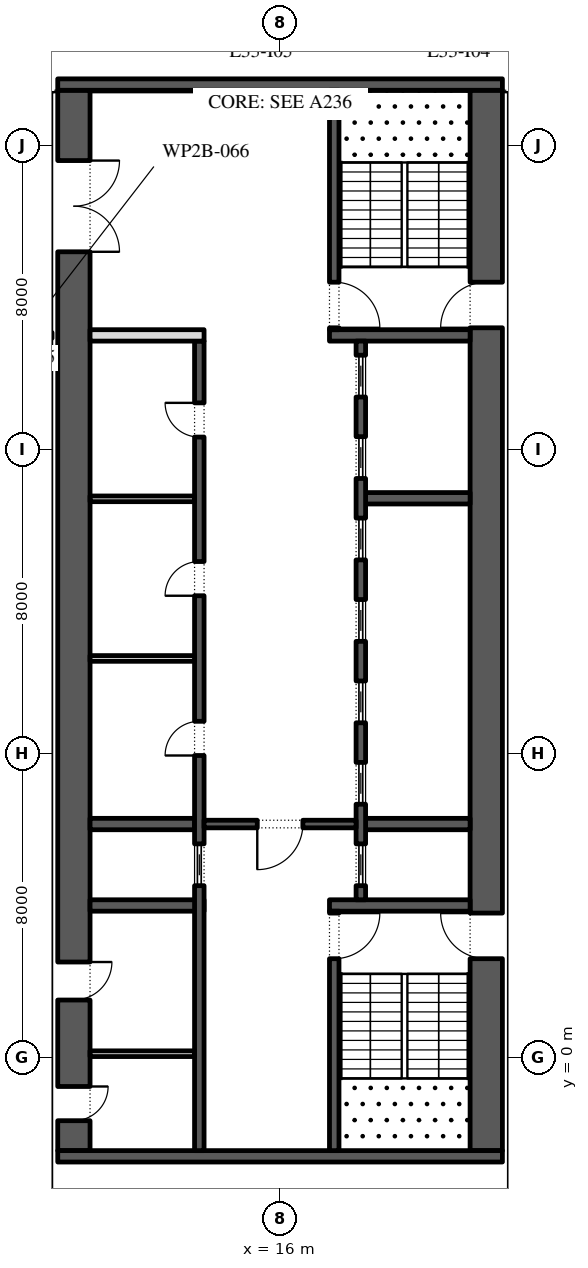
"""IFC4 building model, lengths in metres.
Left out: names, types, materials, properties, quantities, classifications, styles, units other than length and angle.
Written with IfcOpenShell. Run it as: python <this file> out.ifc"""

import sys

from ifc_helpers import new_model, si_unit, direction, frame, frame_2d, origin, place, context, subcontext, project, spatial, rectangle, extrude, element, fill, save


model = new_model("IFC4")
c1 = context("Model", 3, precision=1e-05, world=origin(), true_north=direction((0.0, 1.0)))
c2 = subcontext(c1, "Body", "Model", "MODEL_VIEW")
j1 = project(units=[si_unit("LENGTHUNIT", "METRE"), si_unit("PLANEANGLEUNIT", "RADIAN")], contexts=[c1])
p1 = place(None, origin())
s1 = spatial("IfcSite", under=j1, at=p1, CompositionType="ELEMENT")
p2 = place(p1, origin())
s2 = spatial("IfcBuilding", under=s1, at=p2, CompositionType="ELEMENT")
p3 = place(p2, frame((0.0, 0.0, 151.8)))
s3 = spatial("IfcBuildingStorey", under=s2, at=p3, CompositionType="ELEMENT", Elevation=151.8)
p4 = place(p3, frame((21.425, -2.45, 0.0), z_axis=(0.0, 0.0, 1.0), x_axis=(0.0, 1.0, 0.0)))
e1 = element("IfcWall", 1, at=p4, inside=s3, PredefinedType="SHEAR", context=c2, shape_type="SweptSolid", body=[
    extrude(rectangle(XDim=27.9, YDim=0.85, at=frame_2d((13.95, 0.0))), origin(), (0.0, 0.0, 1.0), 3.95),
])
p5 = place(p4, frame((5.05, 0.0, 0.0)))
e2 = element("IfcOpeningElement", 2, at=p5, cuts=e1, PredefinedType="OPENING", context=c2, shape_type="SweptSolid", body=[
    extrude(rectangle(XDim=1.2, YDim=2.1, at=frame_2d((0.6, 1.05))), frame((0.0, 0.435, 0.0), z_axis=(0.0, -1.0, 0.0), x_axis=(1.0, 0.0, 0.0)), (0.0, 0.0, 1.0), 0.87),
])
p6 = place(p4, frame((21.65, 0.0, 0.0)))
e3 = element("IfcOpeningElement", 3, at=p6, cuts=e1, PredefinedType="OPENING", context=c2, shape_type="SweptSolid", body=[
    extrude(rectangle(XDim=1.2, YDim=2.1, at=frame_2d((0.6, 1.05))), frame((0.0, 0.435, 0.0), z_axis=(0.0, -1.0, 0.0), x_axis=(1.0, 0.0, 0.0)), (0.0, 0.0, 1.0), 0.87),
])
p7 = place(p3, frame((10.575, -2.45, 0.0), z_axis=(0.0, 0.0, 1.0), x_axis=(0.0, 1.0, 0.0)))
e4 = element("IfcWall", 4, at=p7, inside=s3, PredefinedType="SHEAR", context=c2, shape_type="SweptSolid", body=[
    extrude(rectangle(XDim=27.9, YDim=0.85, at=frame_2d((13.95, 0.0))), origin(), (0.0, 0.0, 1.0), 3.95),
])
p8 = place(p7, frame((23.65, 0.0, 0.0)))
e5 = element("IfcOpeningElement", 5, at=p8, cuts=e4, PredefinedType="OPENING", context=c2, shape_type="SweptSolid", body=[
    extrude(rectangle(XDim=2.4, YDim=2.1, at=frame_2d((1.2, 1.05))), frame((0.0, 0.435, 0.0), z_axis=(0.0, -1.0, 0.0), x_axis=(1.0, 0.0, 0.0)), (0.0, 0.0, 1.0), 0.87),
])
p9 = place(p7, frame((0.788, 0.0, 0.0)))
e6 = element("IfcOpeningElement", 6, at=p9, cuts=e4, PredefinedType="OPENING", context=c2, shape_type="SweptSolid", body=[
    extrude(rectangle(XDim=0.9, YDim=2.1, at=frame_2d((0.45, 1.05))), frame((0.0, 0.435, 0.0), z_axis=(0.0, -1.0, 0.0), x_axis=(1.0, 0.0, 0.0)), (0.0, 0.0, 1.0), 0.87),
])
p10 = place(p7, frame((3.962, 0.0, 0.0)))
e7 = element("IfcOpeningElement", 7, at=p10, cuts=e4, PredefinedType="OPENING", context=c2, shape_type="SweptSolid", body=[
    extrude(rectangle(XDim=1.0, YDim=2.1, at=frame_2d((0.5, 1.05))), frame((0.0, 0.435, 0.0), z_axis=(0.0, -1.0, 0.0), x_axis=(1.0, 0.0, 0.0)), (0.0, 0.0, 1.0), 0.87),
])
for number, where, z_axis, x_axis in (
    (8, (10.15, -2.6, 0.0), (0.0, 0.0, 1.0), (1.0, 0.0, 0.0)),
    (9, (10.15, 25.6, 0.0), (0.0, 0.0, 1.0), (1.0, 0.0, 0.0)),
):
    element("IfcWall", number, at=place(p3, frame(where, z_axis=z_axis, x_axis=x_axis)), inside=s3, PredefinedType="SHEAR", context=c2, shape_type="SweptSolid", body=[
        extrude(rectangle(XDim=11.7, YDim=0.3, at=frame_2d((5.85, 0.0))), origin(), (0.0, 0.0, 1.0), 3.95),
    ])
p11 = place(p3, frame((17.3, 4.0, 0.0), z_axis=(0.0, 0.0, 1.0), x_axis=(1.0, 0.0, 0.0)))
e10 = element("IfcWall", 10, at=p11, inside=s3, PredefinedType="SHEAR", context=c2, shape_type="SweptSolid", body=[
    extrude(rectangle(XDim=3.7, YDim=0.3, at=frame_2d((1.85, 0.0))), origin(), (0.0, 0.0, 1.0), 3.95),
])
p12 = place(p3, frame((17.425, -2.45, 0.0), z_axis=(0.0, 0.0, 1.0), x_axis=(0.0, 1.0, 0.0)))
e11 = element("IfcWall", 11, at=p12, inside=s3, PredefinedType="SHEAR", context=c2, shape_type="SweptSolid", body=[
    extrude(rectangle(XDim=6.3, YDim=0.25, at=frame_2d((3.15, 0.0))), origin(), (0.0, 0.0, 1.0), 3.95),
])
p13 = place(p12, frame((5.05, 0.0, 0.0)))
e12 = element("IfcOpeningElement", 12, at=p13, cuts=e11, PredefinedType="OPENING", context=c2, shape_type="SweptSolid", body=[
    extrude(rectangle(XDim=1.2, YDim=2.1, at=frame_2d((0.6, 1.05))), frame((0.0, 0.135, 0.0), z_axis=(0.0, -1.0, 0.0), x_axis=(1.0, 0.0, 0.0)), (0.0, 0.0, 1.0), 0.27),
])
p14 = place(p3, frame((17.3, 19.0, 0.0), z_axis=(0.0, 0.0, 1.0), x_axis=(1.0, 0.0, 0.0)))
e13 = element("IfcWall", 13, at=p14, inside=s3, PredefinedType="SHEAR", context=c2, shape_type="SweptSolid", body=[
    extrude(rectangle(XDim=3.7, YDim=0.3, at=frame_2d((1.85, 0.0))), origin(), (0.0, 0.0, 1.0), 3.95),
])
p15 = place(p3, frame((17.425, 19.15, 0.0), z_axis=(0.0, 0.0, 1.0), x_axis=(0.0, 1.0, 0.0)))
e14 = element("IfcWall", 14, at=p15, inside=s3, PredefinedType="SHEAR", context=c2, shape_type="SweptSolid", body=[
    extrude(rectangle(XDim=6.3, YDim=0.25, at=frame_2d((3.15, 0.0))), origin(), (0.0, 0.0, 1.0), 3.95),
])
p16 = place(p15, frame((0.05, 0.0, 0.0)))
e15 = element("IfcOpeningElement", 15, at=p16, cuts=e14, PredefinedType="OPENING", context=c2, shape_type="SweptSolid", body=[
    extrude(rectangle(XDim=1.2, YDim=2.1, at=frame_2d((0.6, 1.05))), frame((0.0, 0.135, 0.0), z_axis=(0.0, -1.0, 0.0), x_axis=(1.0, 0.0, 0.0)), (0.0, 0.0, 1.0), 0.27),
])
for number, where, z_axis, x_axis in (
    (16, (18.25, 6.143, 0.0), (0.0, 0.0, 1.0), (1.0, 0.0, 0.0)),
    (17, (18.25, 14.714, 0.0), (0.0, 0.0, 1.0), (1.0, 0.0, 0.0)),
):
    element("IfcWall", number, at=place(p3, frame(where, z_axis=z_axis, x_axis=x_axis)), inside=s3, PredefinedType="SHEAR", context=c2, shape_type="SweptSolid", body=[
        extrude(rectangle(XDim=2.75, YDim=0.3, at=frame_2d((1.375, 0.0))), origin(), (0.0, 0.0, 1.0), 3.95),
    ])
p17 = place(p3, frame((18.125, 4.15, 0.0), z_axis=(0.0, 0.0, 1.0), x_axis=(0.0, 1.0, 0.0)))
e18 = element("IfcWall", 18, at=p17, inside=s3, PredefinedType="SHEAR", context=c2, shape_type="SweptSolid", body=[
    extrude(rectangle(XDim=14.7, YDim=0.25, at=frame_2d((7.35, 0.0))), origin(), (0.0, 0.0, 1.0), 3.95),
])
p18 = place(p17, frame((0.371, 0.0, 0.0)))
e19 = element("IfcOpeningElement", 19, at=p18, cuts=e18, PredefinedType="OPENING", context=c2, shape_type="SweptSolid", body=[
    extrude(rectangle(XDim=1.1, YDim=2.1, at=frame_2d((0.55, 1.05))), frame((0.0, 0.135, 0.0), z_axis=(0.0, -1.0, 0.0), x_axis=(1.0, 0.0, 0.0)), (0.0, 0.0, 1.0), 0.27),
])
p19 = place(p17, frame((2.514, 0.0, 0.0)))
e20 = element("IfcOpeningElement", 20, at=p19, cuts=e18, PredefinedType="OPENING", context=c2, shape_type="SweptSolid", body=[
    extrude(rectangle(XDim=1.1, YDim=2.1, at=frame_2d((0.55, 1.05))), frame((0.0, 0.135, 0.0), z_axis=(0.0, -1.0, 0.0), x_axis=(1.0, 0.0, 0.0)), (0.0, 0.0, 1.0), 0.27),
])
p20 = place(p17, frame((4.657, 0.0, 0.0)))
e21 = element("IfcOpeningElement", 21, at=p20, cuts=e18, PredefinedType="OPENING", context=c2, shape_type="SweptSolid", body=[
    extrude(rectangle(XDim=1.1, YDim=2.1, at=frame_2d((0.55, 1.05))), frame((0.0, 0.135, 0.0), z_axis=(0.0, -1.0, 0.0), x_axis=(1.0, 0.0, 0.0)), (0.0, 0.0, 1.0), 0.27),
])
p21 = place(p17, frame((6.8, 0.0, 0.0)))
e22 = element("IfcOpeningElement", 22, at=p21, cuts=e18, PredefinedType="OPENING", context=c2, shape_type="SweptSolid", body=[
    extrude(rectangle(XDim=1.1, YDim=2.1, at=frame_2d((0.55, 1.05))), frame((0.0, 0.135, 0.0), z_axis=(0.0, -1.0, 0.0), x_axis=(1.0, 0.0, 0.0)), (0.0, 0.0, 1.0), 0.27),
])
p22 = place(p17, frame((8.943, 0.0, 0.0)))
e23 = element("IfcOpeningElement", 23, at=p22, cuts=e18, PredefinedType="OPENING", context=c2, shape_type="SweptSolid", body=[
    extrude(rectangle(XDim=1.1, YDim=2.1, at=frame_2d((0.55, 1.05))), frame((0.0, 0.135, 0.0), z_axis=(0.0, -1.0, 0.0), x_axis=(1.0, 0.0, 0.0)), (0.0, 0.0, 1.0), 0.27),
])
p23 = place(p17, frame((11.086, 0.0, 0.0)))
e24 = element("IfcOpeningElement", 24, at=p23, cuts=e18, PredefinedType="OPENING", context=c2, shape_type="SweptSolid", body=[
    extrude(rectangle(XDim=1.1, YDim=2.1, at=frame_2d((0.55, 1.05))), frame((0.0, 0.135, 0.0), z_axis=(0.0, -1.0, 0.0), x_axis=(1.0, 0.0, 0.0)), (0.0, 0.0, 1.0), 0.27),
])
p24 = place(p17, frame((13.229, 0.0, 0.0)))
e25 = element("IfcOpeningElement", 25, at=p24, cuts=e18, PredefinedType="OPENING", context=c2, shape_type="SweptSolid", body=[
    extrude(rectangle(XDim=1.1, YDim=2.1, at=frame_2d((0.55, 1.05))), frame((0.0, 0.135, 0.0), z_axis=(0.0, -1.0, 0.0), x_axis=(1.0, 0.0, 0.0)), (0.0, 0.0, 1.0), 0.27),
])
p25 = place(p3, frame((11.0, 4.0, 0.0), z_axis=(0.0, 0.0, 1.0), x_axis=(1.0, 0.0, 0.0)))
e26 = element("IfcWall", 26, at=p25, inside=s3, PredefinedType="SHEAR", context=c2, shape_type="SweptSolid", body=[
    extrude(rectangle(XDim=3.0, YDim=0.3, at=frame_2d((1.5, 0.0))), origin(), (0.0, 0.0, 1.0), 3.95),
])
p26 = place(p3, frame((11.0, 6.143, 0.0), z_axis=(0.0, 0.0, 1.0), x_axis=(1.0, 0.0, 0.0)))
e27 = element("IfcWall", 27, at=p26, inside=s3, PredefinedType="SHEAR", context=c2, shape_type="SweptSolid", body=[
    extrude(rectangle(XDim=2.75, YDim=0.3, at=frame_2d((1.375, 0.0))), origin(), (0.0, 0.0, 1.0), 3.95),
])
p27 = place(p3, frame((13.875, -2.45, 0.0), z_axis=(0.0, 0.0, 1.0), x_axis=(0.0, 1.0, 0.0)))
e28 = element("IfcWall", 28, at=p27, inside=s3, PredefinedType="SHEAR", context=c2, shape_type="SweptSolid", body=[
    extrude(rectangle(XDim=21.3, YDim=0.25, at=frame_2d((10.65, 0.0))), origin(), (0.0, 0.0, 1.0), 3.95),
])
p28 = place(p27, frame((10.396, 0.0, 0.0)))
e29 = element("IfcOpeningElement", 29, at=p28, cuts=e28, PredefinedType="OPENING", context=c2, shape_type="SweptSolid", body=[
    extrude(rectangle(XDim=0.9, YDim=2.1, at=frame_2d((0.45, 1.05))), frame((0.0, 0.135, 0.0), z_axis=(0.0, -1.0, 0.0), x_axis=(1.0, 0.0, 0.0)), (0.0, 0.0, 1.0), 0.27),
])
p29 = place(p27, frame((14.6, 0.0, 0.0)))
e30 = element("IfcOpeningElement", 30, at=p29, cuts=e28, PredefinedType="OPENING", context=c2, shape_type="SweptSolid", body=[
    extrude(rectangle(XDim=0.9, YDim=2.1, at=frame_2d((0.45, 1.05))), frame((0.0, 0.135, 0.0), z_axis=(0.0, -1.0, 0.0), x_axis=(1.0, 0.0, 0.0)), (0.0, 0.0, 1.0), 0.27),
])
p30 = place(p27, frame((18.775, 0.0, 0.0)))
e31 = element("IfcOpeningElement", 31, at=p30, cuts=e28, PredefinedType="OPENING", context=c2, shape_type="SweptSolid", body=[
    extrude(rectangle(XDim=0.9, YDim=2.1, at=frame_2d((0.45, 1.05))), frame((0.0, 0.135, 0.0), z_axis=(0.0, -1.0, 0.0), x_axis=(1.0, 0.0, 0.0)), (0.0, 0.0, 1.0), 0.27),
])
p31 = place(p27, frame((6.971, 0.0, 0.0)))
e32 = element("IfcOpeningElement", 32, at=p31, cuts=e28, PredefinedType="OPENING", context=c2, shape_type="SweptSolid", body=[
    extrude(rectangle(XDim=1.1, YDim=2.1, at=frame_2d((0.55, 1.05))), frame((0.0, 0.135, 0.0), z_axis=(0.0, -1.0, 0.0), x_axis=(1.0, 0.0, 0.0)), (0.0, 0.0, 1.0), 0.27),
])
p32 = place(p3, frame((11.0, 19.0, 0.0), z_axis=(0.0, 0.0, 1.0), x_axis=(1.0, 0.0, 0.0)))
e33 = element("IfcWall", 33, at=p32, inside=s3, PredefinedType="PARTITIONING", context=c2, shape_type="SweptSolid", body=[
    extrude(rectangle(XDim=3.0, YDim=0.3, at=frame_2d((1.5, 0.0))), origin(), (0.0, 0.0, 1.0), 3.95),
])
for number, where, z_axis, x_axis in (
    (34, (11.0, 10.5, 0.0), (0.0, 0.0, 1.0), (1.0, 0.0, 0.0)),
    (35, (11.0, 14.7, 0.0), (0.0, 0.0, 1.0), (1.0, 0.0, 0.0)),
):
    element("IfcWall", number, at=place(p3, frame(where, z_axis=z_axis, x_axis=x_axis)), inside=s3, PredefinedType="PARTITIONING", context=c2, shape_type="SweptSolid", body=[
        extrude(rectangle(XDim=2.75, YDim=0.15, at=frame_2d((1.375, 0.0))), origin(), (0.0, 0.0, 1.0), 3.95),
    ])
p33 = place(p3, frame((14.0, 6.143, 0.0), z_axis=(0.0, 0.0, 1.0), x_axis=(1.0, 0.0, 0.0)))
e36 = element("IfcWall", 36, at=p33, inside=s3, PredefinedType="SHEAR", context=c2, shape_type="SweptSolid", body=[
    extrude(rectangle(XDim=4.0, YDim=0.2, at=frame_2d((2.0, 0.0))), origin(), (0.0, 0.0, 1.0), 3.95),
])
p34 = place(p33, frame((1.4, 0.0, 0.0)))
e37 = element("IfcOpeningElement", 37, at=p34, cuts=e36, PredefinedType="OPENING", context=c2, shape_type="SweptSolid", body=[
    extrude(rectangle(XDim=1.2, YDim=2.1, at=frame_2d((0.6, 1.05))), frame((0.0, 0.11, 0.0), z_axis=(0.0, -1.0, 0.0), x_axis=(1.0, 0.0, 0.0)), (0.0, 0.0, 1.0), 0.22),
])
p35 = place(p3, frame((11.0, 0.1, 0.0), z_axis=(0.0, 0.0, 1.0), x_axis=(1.0, 0.0, 0.0)))
e38 = element("IfcWall", 38, at=p35, inside=s3, PredefinedType="PARTITIONING", context=c2, shape_type="SweptSolid", body=[
    extrude(rectangle(XDim=2.75, YDim=0.15, at=frame_2d((1.375, 0.0))), origin(), (0.0, 0.0, 1.0), 3.95),
])
p36 = place(p18, origin())
e39 = element("IfcDoor", 39, at=p36, inside=s3, OperationType="SLIDING_TO_LEFT", PredefinedType="DOOR", context=c2, shape_type="SweptSolid", body=[
    extrude(rectangle(XDim=1.1, YDim=2.1, at=frame_2d((0.55, 1.05))), frame((0.0, 0.025, 0.0), z_axis=(0.0, -1.0, 0.0), x_axis=(1.0, 0.0, 0.0)), (0.0, 0.0, 1.0), 0.05),
])
fill(e19, e39)
p37 = place(p19, origin())
e40 = element("IfcDoor", 40, at=p37, inside=s3, OperationType="SLIDING_TO_LEFT", PredefinedType="DOOR", context=c2, shape_type="SweptSolid", body=[
    extrude(rectangle(XDim=1.1, YDim=2.1, at=frame_2d((0.55, 1.05))), frame((0.0, 0.025, 0.0), z_axis=(0.0, -1.0, 0.0), x_axis=(1.0, 0.0, 0.0)), (0.0, 0.0, 1.0), 0.05),
])
fill(e20, e40)
p38 = place(p20, origin())
e41 = element("IfcDoor", 41, at=p38, inside=s3, OperationType="SLIDING_TO_LEFT", PredefinedType="DOOR", context=c2, shape_type="SweptSolid", body=[
    extrude(rectangle(XDim=1.1, YDim=2.1, at=frame_2d((0.55, 1.05))), frame((0.0, 0.025, 0.0), z_axis=(0.0, -1.0, 0.0), x_axis=(1.0, 0.0, 0.0)), (0.0, 0.0, 1.0), 0.05),
])
fill(e21, e41)
p39 = place(p21, origin())
e42 = element("IfcDoor", 42, at=p39, inside=s3, OperationType="SLIDING_TO_LEFT", PredefinedType="DOOR", context=c2, shape_type="SweptSolid", body=[
    extrude(rectangle(XDim=1.1, YDim=2.1, at=frame_2d((0.55, 1.05))), frame((0.0, 0.025, 0.0), z_axis=(0.0, -1.0, 0.0), x_axis=(1.0, 0.0, 0.0)), (0.0, 0.0, 1.0), 0.05),
])
fill(e22, e42)
p40 = place(p22, origin())
e43 = element("IfcDoor", 43, at=p40, inside=s3, OperationType="SLIDING_TO_LEFT", PredefinedType="DOOR", context=c2, shape_type="SweptSolid", body=[
    extrude(rectangle(XDim=1.1, YDim=2.1, at=frame_2d((0.55, 1.05))), frame((0.0, 0.025, 0.0), z_axis=(0.0, -1.0, 0.0), x_axis=(1.0, 0.0, 0.0)), (0.0, 0.0, 1.0), 0.05),
])
fill(e23, e43)
p41 = place(p23, origin())
e44 = element("IfcDoor", 44, at=p41, inside=s3, OperationType="SLIDING_TO_LEFT", PredefinedType="DOOR", context=c2, shape_type="SweptSolid", body=[
    extrude(rectangle(XDim=1.1, YDim=2.1, at=frame_2d((0.55, 1.05))), frame((0.0, 0.025, 0.0), z_axis=(0.0, -1.0, 0.0), x_axis=(1.0, 0.0, 0.0)), (0.0, 0.0, 1.0), 0.05),
])
fill(e24, e44)
p42 = place(p24, origin())
e45 = element("IfcDoor", 45, at=p42, inside=s3, OperationType="SLIDING_TO_LEFT", PredefinedType="DOOR", context=c2, shape_type="SweptSolid", body=[
    extrude(rectangle(XDim=1.1, YDim=2.1, at=frame_2d((0.55, 1.05))), frame((0.0, 0.025, 0.0), z_axis=(0.0, -1.0, 0.0), x_axis=(1.0, 0.0, 0.0)), (0.0, 0.0, 1.0), 0.05),
])
fill(e25, e45)
p43 = place(p28, origin())
e46 = element("IfcDoor", 46, at=p43, inside=s3, OperationType="SINGLE_SWING_RIGHT", PredefinedType="DOOR", context=c2, shape_type="SweptSolid", body=[
    extrude(rectangle(XDim=0.9, YDim=2.1, at=frame_2d((0.45, 1.05))), frame((0.0, 0.125, 0.0), z_axis=(0.0, -1.0, 0.0), x_axis=(1.0, 0.0, 0.0)), (0.0, 0.0, 1.0), 0.05),
])
fill(e29, e46)
p44 = place(p29, origin())
e47 = element("IfcDoor", 47, at=p44, inside=s3, OperationType="SINGLE_SWING_RIGHT", PredefinedType="DOOR", context=c2, shape_type="SweptSolid", body=[
    extrude(rectangle(XDim=0.9, YDim=2.1, at=frame_2d((0.45, 1.05))), frame((0.0, 0.125, 0.0), z_axis=(0.0, -1.0, 0.0), x_axis=(1.0, 0.0, 0.0)), (0.0, 0.0, 1.0), 0.05),
])
fill(e30, e47)
p45 = place(p30, origin())
e48 = element("IfcDoor", 48, at=p45, inside=s3, OperationType="SINGLE_SWING_LEFT", PredefinedType="DOOR", context=c2, shape_type="SweptSolid", body=[
    extrude(rectangle(XDim=0.9, YDim=2.1, at=frame_2d((0.45, 1.05))), frame((0.0, 0.125, 0.0), z_axis=(0.0, -1.0, 0.0), x_axis=(1.0, 0.0, 0.0)), (0.0, 0.0, 1.0), 0.05),
])
fill(e31, e48)
p46 = place(p31, origin())
e49 = element("IfcDoor", 49, at=p46, inside=s3, OperationType="SLIDING_TO_LEFT", PredefinedType="DOOR", context=c2, shape_type="SweptSolid", body=[
    extrude(rectangle(XDim=1.1, YDim=2.1, at=frame_2d((0.55, 1.05))), frame((0.0, 0.025, 0.0), z_axis=(0.0, -1.0, 0.0), x_axis=(1.0, 0.0, 0.0)), (0.0, 0.0, 1.0), 0.05),
])
fill(e32, e49)
p47 = place(p34, frame((1.2, 0.0, 0.0), z_axis=(0.0, 0.0, 1.0), x_axis=(-1.0, 0.0, 0.0)))
e50 = element("IfcDoor", 50, at=p47, inside=s3, OperationType="SINGLE_SWING_LEFT", PredefinedType="DOOR", context=c2, shape_type="SweptSolid", body=[
    extrude(rectangle(XDim=1.2, YDim=2.1, at=frame_2d((0.6, 1.05))), frame((0.0, 0.025, 0.0), z_axis=(0.0, -1.0, 0.0), x_axis=(1.0, 0.0, 0.0)), (0.0, 0.0, 1.0), 0.05),
])
fill(e37, e50)
p48 = place(p8, frame((2.4, 0.0, 0.0), z_axis=(0.0, 0.0, 1.0), x_axis=(-1.0, 0.0, 0.0)))
e51 = element("IfcDoor", 51, at=p48, inside=s3, OperationType="DOUBLE_DOOR_SINGLE_SWING", PredefinedType="DOOR", context=c2, shape_type="SweptSolid", body=[
    extrude(rectangle(XDim=2.4, YDim=2.1, at=frame_2d((1.2, 1.05))), frame((0.0, 0.025, 0.0), z_axis=(0.0, -1.0, 0.0), x_axis=(1.0, 0.0, 0.0)), (0.0, 0.0, 1.0), 0.05),
])
fill(e5, e51)
p49 = place(p13, frame((1.2, 0.0, 0.0), z_axis=(0.0, 0.0, 1.0), x_axis=(-1.0, 0.0, 0.0)))
e52 = element("IfcDoor", 52, at=p49, inside=s3, OperationType="SINGLE_SWING_RIGHT", PredefinedType="DOOR", context=c2, shape_type="SweptSolid", body=[
    extrude(rectangle(XDim=1.2, YDim=2.1, at=frame_2d((0.6, 1.05))), frame((0.0, 0.025, 0.0), z_axis=(0.0, -1.0, 0.0), x_axis=(1.0, 0.0, 0.0)), (0.0, 0.0, 1.0), 0.05),
])
fill(e12, e52)
p50 = place(p5, origin())
e53 = element("IfcDoor", 53, at=p50, inside=s3, OperationType="SINGLE_SWING_LEFT", PredefinedType="DOOR", context=c2, shape_type="SweptSolid", body=[
    extrude(rectangle(XDim=1.2, YDim=2.1, at=frame_2d((0.6, 1.05))), frame((0.0, 0.025, 0.0), z_axis=(0.0, -1.0, 0.0), x_axis=(1.0, 0.0, 0.0)), (0.0, 0.0, 1.0), 0.05),
])
fill(e2, e53)
p51 = place(p16, frame((1.2, 0.0, 0.0), z_axis=(0.0, 0.0, 1.0), x_axis=(-1.0, 0.0, 0.0)))
e54 = element("IfcDoor", 54, at=p51, inside=s3, OperationType="SINGLE_SWING_LEFT", PredefinedType="DOOR", context=c2, shape_type="SweptSolid", body=[
    extrude(rectangle(XDim=1.2, YDim=2.1, at=frame_2d((0.6, 1.05))), frame((0.0, 0.025, 0.0), z_axis=(0.0, -1.0, 0.0), x_axis=(1.0, 0.0, 0.0)), (0.0, 0.0, 1.0), 0.05),
])
fill(e15, e54)
p52 = place(p6, origin())
e55 = element("IfcDoor", 55, at=p52, inside=s3, OperationType="SINGLE_SWING_RIGHT", PredefinedType="DOOR", context=c2, shape_type="SweptSolid", body=[
    extrude(rectangle(XDim=1.2, YDim=2.1, at=frame_2d((0.6, 1.05))), frame((0.0, 0.025, 0.0), z_axis=(0.0, -1.0, 0.0), x_axis=(1.0, 0.0, 0.0)), (0.0, 0.0, 1.0), 0.05),
])
fill(e3, e55)
p53 = place(p9, frame((0.9, -0.8, 0.0), z_axis=(0.0, 0.0, 1.0), x_axis=(-1.0, 0.0, 0.0)))
e56 = element("IfcDoor", 56, at=p53, inside=s3, OperationType="SINGLE_SWING_RIGHT", PredefinedType="DOOR", context=c2, shape_type="SweptSolid", body=[
    extrude(rectangle(XDim=0.9, YDim=2.1, at=frame_2d((0.45, 1.05))), frame((0.0, -0.375, 0.0), z_axis=(0.0, -1.0, 0.0), x_axis=(1.0, 0.0, 0.0)), (0.0, 0.0, 1.0), 0.05),
])
fill(e6, e56)
p54 = place(p10, frame((1.0, -0.8, 0.0), z_axis=(0.0, 0.0, 1.0), x_axis=(-1.0, 0.0, 0.0)))
e57 = element("IfcDoor", 57, at=p54, inside=s3, OperationType="SINGLE_SWING_RIGHT", PredefinedType="DOOR", context=c2, shape_type="SweptSolid", body=[
    extrude(rectangle(XDim=1.0, YDim=2.1, at=frame_2d((0.5, 1.05))), frame((0.0, -0.375, 0.0), z_axis=(0.0, -1.0, 0.0), x_axis=(1.0, 0.0, 0.0)), (0.0, 0.0, 1.0), 0.05),
])
fill(e7, e57)
save(model, sys.argv[1])
